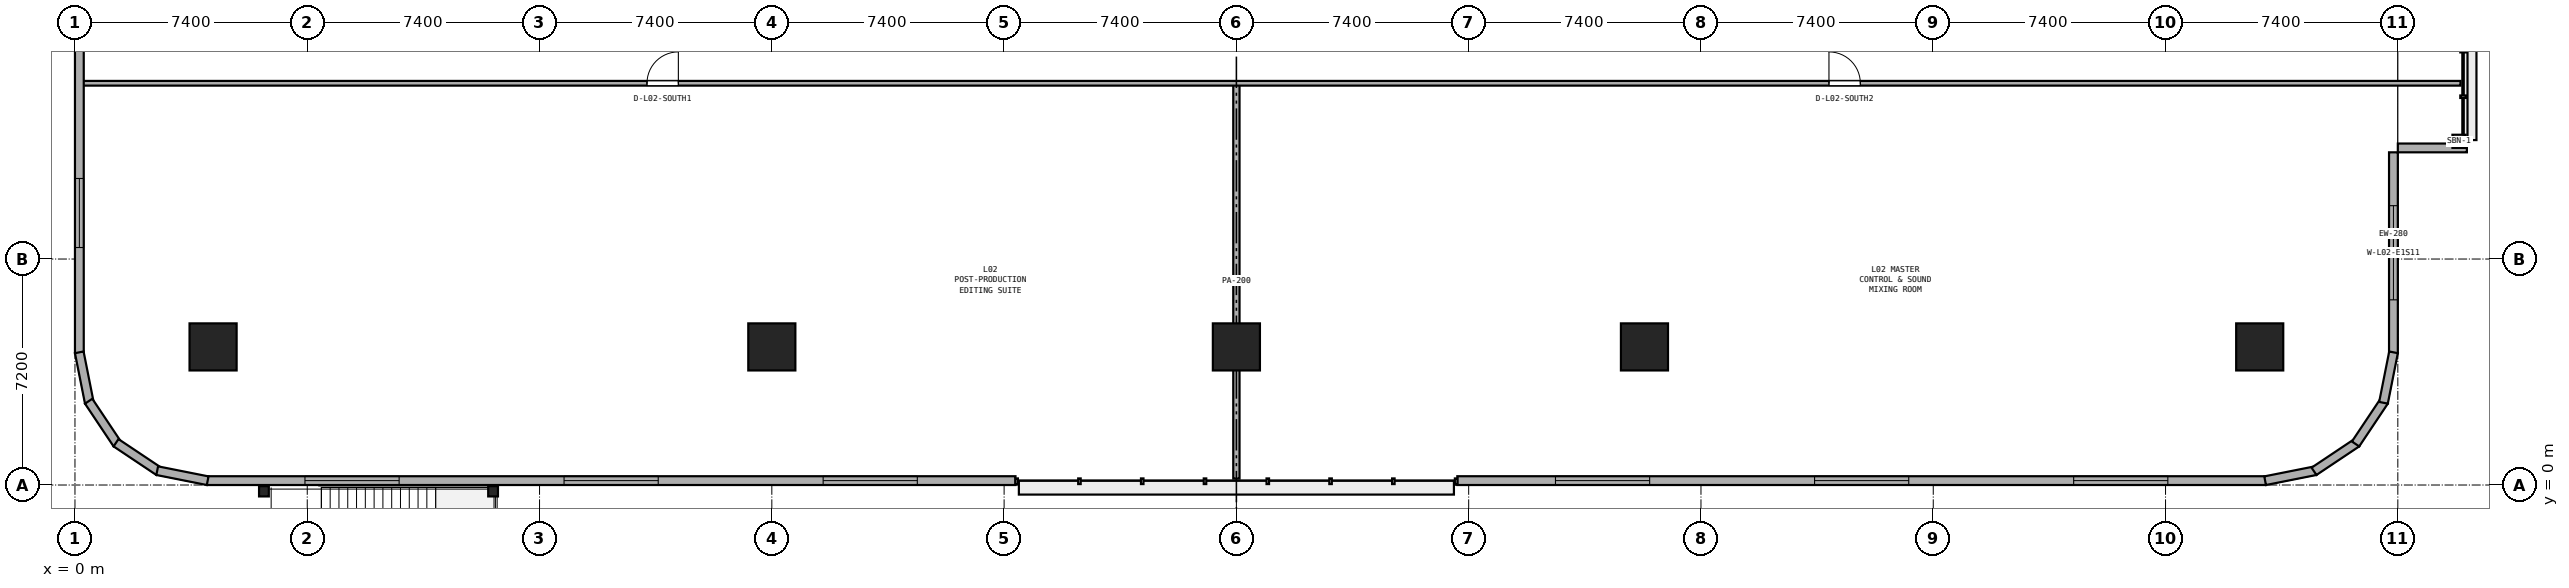
"""IFC4 building model, lengths in metres.
Left out: names, types, materials, properties, quantities, classifications, styles, units other than length and angle.
Written with IfcOpenShell. Run it as: python <this file> out.ifc"""

import sys

from ifc_helpers import new_model, si_unit, direction, frame, frame_2d, origin, origin_2d, place, context, subcontext, project, spatial, rectangle, i_section, extrude, element, fill, save


model = new_model("IFC4")
c1 = context("Model", 3, precision=1e-05, world=origin(), true_north=direction((0.0, 1.0)))
c2 = subcontext(c1, "Body", "Model", "MODEL_VIEW")
j1 = project(units=[si_unit("LENGTHUNIT", "METRE"), si_unit("PLANEANGLEUNIT", "RADIAN")], contexts=[c1])
p1 = place(None, origin())
s1 = spatial("IfcSite", under=j1, at=p1, CompositionType="ELEMENT")
p2 = place(p1, origin())
s2 = spatial("IfcBuilding", under=s1, at=p2, CompositionType="ELEMENT")
p3 = place(p2, frame((0.0, 0.0, 10.0)))
s3 = spatial("IfcBuildingStorey", under=s2, at=p3, CompositionType="ELEMENT", Elevation=10.0)
for number, where, z_axis, x_axis in (
    (1, (4.4, 4.4, 0.0), (0.0, 0.0, 1.0), (1.0, 0.0, 0.0)),
    (2, (22.2, 4.4, 0.0), (0.0, 0.0, 1.0), (1.0, 0.0, 0.0)),
    (3, (37.0, 4.4, 0.0), (0.0, 0.0, 1.0), (1.0, 0.0, 0.0)),
    (4, (50.0, 4.4, 0.0), (0.0, 0.0, 1.0), (1.0, 0.0, 0.0)),
    (5, (69.6, 4.4, 0.0), (0.0, 0.0, 1.0), (1.0, 0.0, 0.0)),
):
    element("IfcColumn", number, at=place(p3, frame(where, z_axis=z_axis, x_axis=x_axis)), inside=s3, PredefinedType="COLUMN", context=c2, shape_type="SweptSolid", body=[
        extrude(rectangle(XDim=1.5, YDim=1.5, at=origin_2d()), origin(), (0.0, 0.0, 1.0), 5.0),
    ])
for number, where, z_axis, x_axis in (
    (6, (6.02, -0.2, 0.0), (0.0, 0.0, 1.0), (1.0, 0.0, 0.0)),
    (7, (13.32, -0.2, 0.0), (0.0, 0.0, 1.0), (1.0, 0.0, 0.0)),
):
    element("IfcColumn", number, at=place(p3, frame(where, z_axis=z_axis, x_axis=x_axis)), inside=s3, PredefinedType="COLUMN", context=c2, shape_type="SweptSolid", body=[
        extrude(i_section(OverallWidth=0.311, OverallDepth=0.327, WebThickness=0.016, FlangeThickness=0.025, at=origin_2d()), origin(), (0.0, 0.0, 1.0), 5.0),
    ])
p4 = place(p3, frame((37.0, 0.205, 0.0), z_axis=(0.0, 0.0, 1.0), x_axis=(0.0, 1.0, 0.0)))
e8 = element("IfcWall", 8, at=p4, inside=s3, PredefinedType="PARTITIONING", context=c2, shape_type="SweptSolid", body=[
    extrude(rectangle(XDim=12.595, YDim=0.2, at=frame_2d((6.297, 0.0))), origin(), (0.0, 0.0, 1.0), 3.91),
])
p5 = place(p3, frame((0.205, 12.8, 0.0), z_axis=(0.0, 0.0, 1.0), x_axis=(1.0, 0.0, 0.0)))
e9 = element("IfcWall", 9, at=p5, inside=s3, PredefinedType="PARTITIONING", context=c2, shape_type="SweptSolid", body=[
    extrude(rectangle(XDim=75.79, YDim=0.15, at=frame_2d((37.895, 0.0))), origin(), (0.0, 0.0, 1.0), 4.68),
])
p6 = place(p5, frame((18.018, 0.0, 0.0)))
e10 = element("IfcOpeningElement", 10, at=p6, cuts=e9, PredefinedType="OPENING", context=c2, shape_type="SweptSolid", body=[
    extrude(rectangle(XDim=1.0, YDim=2.12, at=frame_2d((0.5, 1.06))), frame((0.0, 0.085, 0.0), z_axis=(0.0, -1.0, 0.0), x_axis=(1.0, 0.0, 0.0)), (0.0, 0.0, 1.0), 0.17),
])
p7 = place(p5, frame((55.673, 0.0, 0.0)))
e11 = element("IfcOpeningElement", 11, at=p7, cuts=e9, PredefinedType="OPENING", context=c2, shape_type="SweptSolid", body=[
    extrude(rectangle(XDim=1.0, YDim=2.12, at=frame_2d((0.5, 1.06))), frame((0.0, 0.085, 0.0), z_axis=(0.0, -1.0, 0.0), x_axis=(1.0, 0.0, 0.0)), (0.0, 0.0, 1.0), 0.17),
])
p8 = place(p3, frame((73.86, 4.2, 0.0), z_axis=(0.0, 0.0, 1.0), x_axis=(0.0, 1.0, 0.0)))
e12 = element("IfcWall", 12, at=p8, inside=s3, PredefinedType="STANDARD", context=c2, shape_type="SweptSolid", body=[
    extrude(rectangle(XDim=6.4, YDim=0.28, at=frame_2d((3.2, 0.0))), origin(), (0.0, 0.0, 1.0), 3.78),
])
p9 = place(p8, frame((1.7, 0.0, 0.9)))
e13 = element("IfcOpeningElement", 13, at=p9, cuts=e12, PredefinedType="OPENING", context=c2, shape_type="SweptSolid", body=[
    extrude(rectangle(XDim=3.0, YDim=2.2, at=frame_2d((1.5, 1.1))), frame((0.0, 0.15, 0.0), z_axis=(0.0, -1.0, 0.0), x_axis=(1.0, 0.0, 0.0)), (0.0, 0.0, 1.0), 0.3),
])
p10 = place(p3, frame((0.14, 29.0, 0.0), z_axis=(0.0, 0.0, 1.0), x_axis=(0.0, -1.0, 0.0)))
e14 = element("IfcWall", 14, at=p10, inside=s3, PredefinedType="STANDARD", context=c2, shape_type="SweptSolid", body=[
    extrude(rectangle(XDim=24.8, YDim=0.28, at=frame_2d((12.4, 0.0))), origin(), (0.0, 0.0, 1.0), 3.78),
])
p11 = place(p10, frame((3.367, 0.0, 0.9)))
e15 = element("IfcOpeningElement", 15, at=p11, cuts=e14, PredefinedType="OPENING", context=c2, shape_type="SweptSolid", body=[
    extrude(rectangle(XDim=2.2, YDim=1.95, at=frame_2d((1.1, 0.975))), frame((0.0, 0.15, 0.0), z_axis=(0.0, -1.0, 0.0), x_axis=(1.0, 0.0, 0.0)), (0.0, 0.0, 1.0), 0.3),
])
p12 = place(p10, frame((19.233, 0.0, 0.9)))
e16 = element("IfcOpeningElement", 16, at=p12, cuts=e14, PredefinedType="OPENING", context=c2, shape_type="SweptSolid", body=[
    extrude(rectangle(XDim=2.2, YDim=1.95, at=frame_2d((1.1, 0.975))), frame((0.0, 0.15, 0.0), z_axis=(0.0, -1.0, 0.0), x_axis=(1.0, 0.0, 0.0)), (0.0, 0.0, 1.0), 0.3),
])
p13 = place(p3, frame((4.2, 0.14, 0.0), z_axis=(0.0, 0.0, 1.0), x_axis=(1.0, 0.0, 0.0)))
e17 = element("IfcWall", 17, at=p13, inside=s3, PredefinedType="STANDARD", context=c2, shape_type="SweptSolid", body=[
    extrude(rectangle(XDim=25.762, YDim=0.28, at=frame_2d((12.881, 0.0))), origin(), (0.0, 0.0, 1.0), 4.68),
])
p14 = place(p13, frame((3.127, 0.0, 0.9)))
e18 = element("IfcOpeningElement", 18, at=p14, cuts=e17, PredefinedType="OPENING", context=c2, shape_type="SweptSolid", body=[
    extrude(rectangle(XDim=3.0, YDim=2.2, at=frame_2d((1.5, 1.1))), frame((0.0, 0.15, 0.0), z_axis=(0.0, -1.0, 0.0), x_axis=(1.0, 0.0, 0.0)), (0.0, 0.0, 1.0), 0.3),
])
p15 = place(p13, frame((11.381, 0.0, 0.9)))
e19 = element("IfcOpeningElement", 19, at=p15, cuts=e17, PredefinedType="OPENING", context=c2, shape_type="SweptSolid", body=[
    extrude(rectangle(XDim=3.0, YDim=2.2, at=frame_2d((1.5, 1.1))), frame((0.0, 0.15, 0.0), z_axis=(0.0, -1.0, 0.0), x_axis=(1.0, 0.0, 0.0)), (0.0, 0.0, 1.0), 0.3),
])
p16 = place(p13, frame((19.635, 0.0, 0.9)))
e20 = element("IfcOpeningElement", 20, at=p16, cuts=e17, PredefinedType="OPENING", context=c2, shape_type="SweptSolid", body=[
    extrude(rectangle(XDim=3.0, YDim=2.2, at=frame_2d((1.5, 1.1))), frame((0.0, 0.15, 0.0), z_axis=(0.0, -1.0, 0.0), x_axis=(1.0, 0.0, 0.0)), (0.0, 0.0, 1.0), 0.3),
])
p17 = place(p3, frame((44.038, 0.14, 0.0), z_axis=(0.0, 0.0, 1.0), x_axis=(1.0, 0.0, 0.0)))
e21 = element("IfcWall", 21, at=p17, inside=s3, PredefinedType="STANDARD", context=c2, shape_type="SweptSolid", body=[
    extrude(rectangle(XDim=25.762, YDim=0.28, at=frame_2d((12.881, 0.0))), origin(), (0.0, 0.0, 1.0), 4.68),
])
p18 = place(p17, frame((3.127, 0.0, 0.9)))
e22 = element("IfcOpeningElement", 22, at=p18, cuts=e21, PredefinedType="OPENING", context=c2, shape_type="SweptSolid", body=[
    extrude(rectangle(XDim=3.0, YDim=2.2, at=frame_2d((1.5, 1.1))), frame((0.0, 0.15, 0.0), z_axis=(0.0, -1.0, 0.0), x_axis=(1.0, 0.0, 0.0)), (0.0, 0.0, 1.0), 0.3),
])
p19 = place(p17, frame((11.381, 0.0, 0.9)))
e23 = element("IfcOpeningElement", 23, at=p19, cuts=e21, PredefinedType="OPENING", context=c2, shape_type="SweptSolid", body=[
    extrude(rectangle(XDim=3.0, YDim=2.2, at=frame_2d((1.5, 1.1))), frame((0.0, 0.15, 0.0), z_axis=(0.0, -1.0, 0.0), x_axis=(1.0, 0.0, 0.0)), (0.0, 0.0, 1.0), 0.3),
])
p20 = place(p17, frame((19.635, 0.0, 0.9)))
e24 = element("IfcOpeningElement", 24, at=p20, cuts=e21, PredefinedType="OPENING", context=c2, shape_type="SweptSolid", body=[
    extrude(rectangle(XDim=3.0, YDim=2.2, at=frame_2d((1.5, 1.1))), frame((0.0, 0.15, 0.0), z_axis=(0.0, -1.0, 0.0), x_axis=(1.0, 0.0, 0.0)), (0.0, 0.0, 1.0), 0.3),
])
for number, where, z_axis, x_axis in (
    (25, (0.137, 4.227, 0.0), (0.0, 0.0, 1.0), (0.195, -0.981, 0.0)),
    (26, (0.436, 2.67, 0.0), (0.0, 0.0, 1.0), (0.556, -0.831, 0.0)),
    (27, (1.308, 1.347, 0.0), (0.0, 0.0, 1.0), (0.831, -0.556, 0.0)),
    (28, (2.62, 0.457, 0.0), (0.0, 0.0, 1.0), (0.981, -0.195, 0.0)),
    (29, (69.773, 0.137, 0.0), (0.0, 0.0, 1.0), (0.981, 0.195, 0.0)),
    (30, (71.33, 0.436, 0.0), (0.0, 0.0, 1.0), (0.831, 0.556, 0.0)),
    (31, (72.653, 1.308, 0.0), (0.0, 0.0, 1.0), (0.556, 0.831, 0.0)),
    (32, (73.543, 2.62, 0.0), (0.0, 0.0, 1.0), (0.195, 0.981, 0.0)),
):
    element("IfcWall", number, at=place(p3, frame(where, z_axis=z_axis, x_axis=x_axis)), inside=s3, PredefinedType="STANDARD", context=c2, shape_type="SweptSolid", body=[
        extrude(rectangle(XDim=1.639, YDim=0.28, at=frame_2d((0.819, 0.0))), origin(), (0.0, 0.0, 1.0), 4.68),
    ])
p21 = place(p3, frame((74.0, 10.74, 0.0), z_axis=(0.0, 0.0, 1.0), x_axis=(1.0, 0.0, 0.0)))
e33 = element("IfcWall", 33, at=p21, inside=s3, PredefinedType="STANDARD", context=c2, shape_type="SweptSolid", body=[
    extrude(rectangle(XDim=2.2, YDim=0.28, at=frame_2d((1.1, 0.0))), origin(), (0.0, 0.0, 1.0), 3.987),
])
p22 = place(p6, origin())
e34 = element("IfcDoor", 34, at=p22, inside=s3, OperationType="SINGLE_SWING_RIGHT", PredefinedType="DOOR", context=c2, shape_type="SweptSolid", body=[
    extrude(rectangle(XDim=1.0, YDim=2.12, at=frame_2d((0.5, 1.06))), frame((0.0, 0.025, 0.0), z_axis=(0.0, -1.0, 0.0), x_axis=(1.0, 0.0, 0.0)), (0.0, 0.0, 1.0), 0.05),
])
fill(e10, e34)
p23 = place(p7, origin())
e35 = element("IfcDoor", 35, at=p23, inside=s3, OperationType="SINGLE_SWING_LEFT", PredefinedType="DOOR", context=c2, shape_type="SweptSolid", body=[
    extrude(rectangle(XDim=1.0, YDim=2.12, at=frame_2d((0.5, 1.06))), frame((0.0, 0.025, 0.0), z_axis=(0.0, -1.0, 0.0), x_axis=(1.0, 0.0, 0.0)), (0.0, 0.0, 1.0), 0.05),
])
fill(e11, e35)
p24 = place(p9, origin())
e36 = element("IfcWindow", 36, at=p24, inside=s3, PartitioningType="SINGLE_PANEL", PredefinedType="WINDOW", context=c2, shape_type="SweptSolid", body=[
    extrude(rectangle(XDim=3.0, YDim=2.2, at=frame_2d((1.5, 1.1))), frame((0.0, 0.03, 0.0), z_axis=(0.0, -1.0, 0.0), x_axis=(1.0, 0.0, 0.0)), (0.0, 0.0, 1.0), 0.06),
])
fill(e13, e36)
p25 = place(p12, origin())
e37 = element("IfcWindow", 37, at=p25, inside=s3, PartitioningType="SINGLE_PANEL", PredefinedType="WINDOW", context=c2, shape_type="SweptSolid", body=[
    extrude(rectangle(XDim=2.2, YDim=1.95, at=frame_2d((1.1, 0.975))), frame((0.0, 0.03, 0.0), z_axis=(0.0, -1.0, 0.0), x_axis=(1.0, 0.0, 0.0)), (0.0, 0.0, 1.0), 0.06),
])
fill(e16, e37)
p26 = place(p14, origin())
e38 = element("IfcWindow", 38, at=p26, inside=s3, PartitioningType="SINGLE_PANEL", PredefinedType="WINDOW", context=c2, shape_type="SweptSolid", body=[
    extrude(rectangle(XDim=3.0, YDim=2.2, at=frame_2d((1.5, 1.1))), frame((0.0, 0.03, 0.0), z_axis=(0.0, -1.0, 0.0), x_axis=(1.0, 0.0, 0.0)), (0.0, 0.0, 1.0), 0.06),
])
fill(e18, e38)
p27 = place(p15, origin())
e39 = element("IfcWindow", 39, at=p27, inside=s3, PartitioningType="SINGLE_PANEL", PredefinedType="WINDOW", context=c2, shape_type="SweptSolid", body=[
    extrude(rectangle(XDim=3.0, YDim=2.2, at=frame_2d((1.5, 1.1))), frame((0.0, 0.03, 0.0), z_axis=(0.0, -1.0, 0.0), x_axis=(1.0, 0.0, 0.0)), (0.0, 0.0, 1.0), 0.06),
])
fill(e19, e39)
p28 = place(p16, origin())
e40 = element("IfcWindow", 40, at=p28, inside=s3, PartitioningType="SINGLE_PANEL", PredefinedType="WINDOW", context=c2, shape_type="SweptSolid", body=[
    extrude(rectangle(XDim=3.0, YDim=2.2, at=frame_2d((1.5, 1.1))), frame((0.0, 0.03, 0.0), z_axis=(0.0, -1.0, 0.0), x_axis=(1.0, 0.0, 0.0)), (0.0, 0.0, 1.0), 0.06),
])
fill(e20, e40)
p29 = place(p18, origin())
e41 = element("IfcWindow", 41, at=p29, inside=s3, PartitioningType="SINGLE_PANEL", PredefinedType="WINDOW", context=c2, shape_type="SweptSolid", body=[
    extrude(rectangle(XDim=3.0, YDim=2.2, at=frame_2d((1.5, 1.1))), frame((0.0, 0.03, 0.0), z_axis=(0.0, -1.0, 0.0), x_axis=(1.0, 0.0, 0.0)), (0.0, 0.0, 1.0), 0.06),
])
fill(e22, e41)
p30 = place(p19, origin())
e42 = element("IfcWindow", 42, at=p30, inside=s3, PartitioningType="SINGLE_PANEL", PredefinedType="WINDOW", context=c2, shape_type="SweptSolid", body=[
    extrude(rectangle(XDim=3.0, YDim=2.2, at=frame_2d((1.5, 1.1))), frame((0.0, 0.03, 0.0), z_axis=(0.0, -1.0, 0.0), x_axis=(1.0, 0.0, 0.0)), (0.0, 0.0, 1.0), 0.06),
])
fill(e23, e42)
p31 = place(p20, origin())
e43 = element("IfcWindow", 43, at=p31, inside=s3, PartitioningType="SINGLE_PANEL", PredefinedType="WINDOW", context=c2, shape_type="SweptSolid", body=[
    extrude(rectangle(XDim=3.0, YDim=2.2, at=frame_2d((1.5, 1.1))), frame((0.0, 0.03, 0.0), z_axis=(0.0, -1.0, 0.0), x_axis=(1.0, 0.0, 0.0)), (0.0, 0.0, 1.0), 0.06),
])
fill(e24, e43)
save(model, sys.argv[1])
